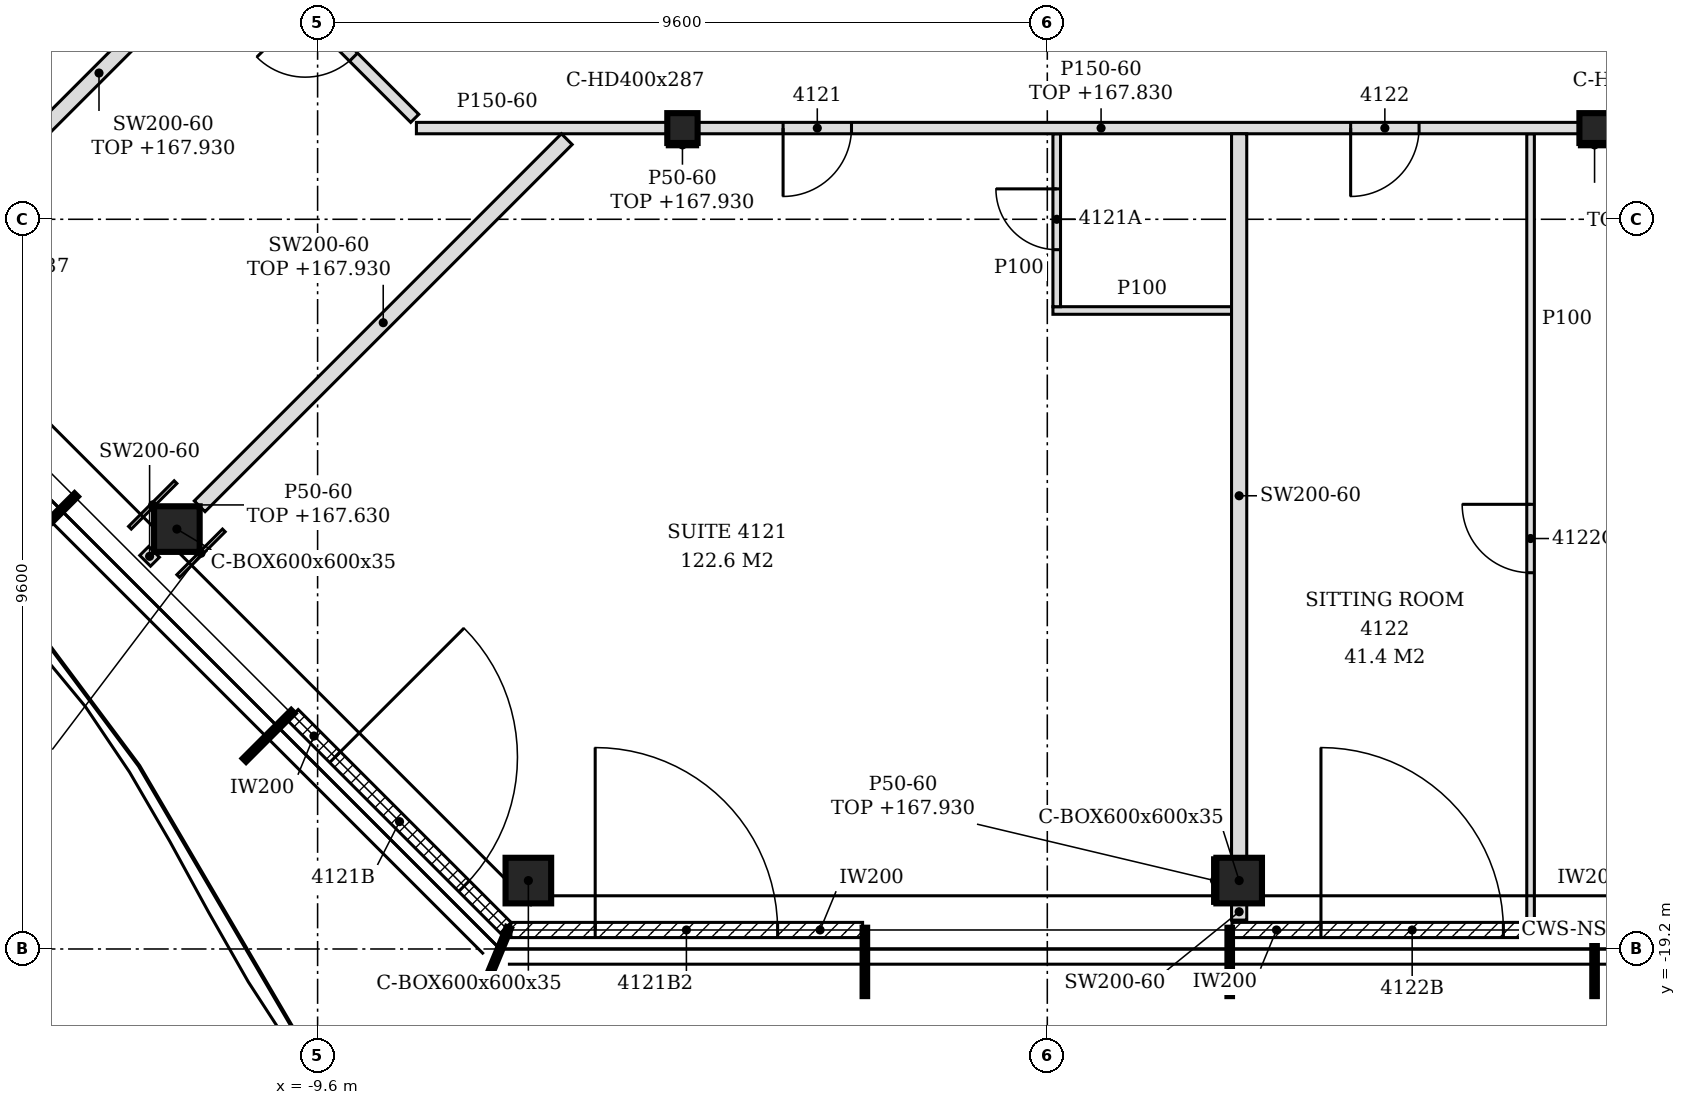
"""IFC4 building model, lengths in metres.
Left out: names, types, materials, properties, quantities, classifications, styles, units other than length and angle.
Written with IfcOpenShell. Run it as: python <this file> out.ifc"""

import sys

from ifc_helpers import new_model, si_unit, direction, frame, frame_2d, origin, origin_2d, place, context, subcontext, project, spatial, polyline, rectangle, hollow_rectangle, i_section, outline, extrude, element, fill, save


model = new_model("IFC4")
c1 = context("Model", 3, precision=1e-05, world=origin(), true_north=direction((0.0, 1.0)))
c2 = subcontext(c1, "Body", "Model", "MODEL_VIEW")
j1 = project(units=[si_unit("LENGTHUNIT", "METRE"), si_unit("PLANEANGLEUNIT", "RADIAN")], contexts=[c1])
p1 = place(None, origin())
s1 = spatial("IfcSite", under=j1, at=p1, CompositionType="ELEMENT")
p2 = place(p1, origin())
s2 = spatial("IfcBuilding", under=s1, at=p2, CompositionType="ELEMENT")
p3 = place(p2, frame((0.0, 0.0, 165.0)))
s3 = spatial("IfcBuildingStorey", under=s2, at=p3, CompositionType="ELEMENT", Elevation=165.0)
for number, where, z_axis, x_axis in (
    (1, (-6.827, -18.3, -0.15), (0.0, 0.0, 1.0), (1.0, 0.0, 0.0)),
    (2, (2.524, -18.3, -0.15), (0.0, 0.0, 1.0), (1.0, 0.0, 0.0)),
    (3, (-11.451, -13.676, -0.15), (0.0, 0.0, 1.0), (1.0, 0.0, 0.0)),
):
    element("IfcColumn", number, at=place(p3, frame(where, z_axis=z_axis, x_axis=x_axis)), inside=s3, PredefinedType="COLUMN", context=c2, shape_type="SweptSolid", body=[
        extrude(hollow_rectangle(XDim=0.6, YDim=0.6, WallThickness=0.035, at=origin_2d()), origin(), (0.0, 0.0, 1.0), 3.6),
    ])
for number, where, z_axis, x_axis in (
    (4, (-4.8, -8.4, -0.15), (0.0, 0.0, 1.0), (1.0, 0.0, 0.0)),
    (5, (7.2, -8.4, -0.15), (0.0, 0.0, 1.0), (1.0, 0.0, 0.0)),
):
    element("IfcColumn", number, at=place(p3, frame(where, z_axis=z_axis, x_axis=x_axis)), inside=s3, PredefinedType="COLUMN", context=c2, shape_type="SweptSolid", body=[
        extrude(i_section(OverallWidth=0.399, OverallDepth=0.393, WebThickness=0.023, FlangeThickness=0.037, FilletRadius=0.015, at=origin_2d()), origin(), (0.0, 0.0, 1.0), 3.6),
    ])
p4 = place(p3, frame((-7.056, -18.95, 0.0), z_axis=(0.0, 0.0, 1.0), x_axis=(1.0, 0.0, 0.0)))
e6 = element("IfcWall", 6, at=p4, inside=s3, PredefinedType="NOTDEFINED", context=c2, shape_type="SweptSolid", body=[
    extrude(rectangle(XDim=4.626, YDim=0.2, at=frame_2d((2.313, 0.0))), origin(), (0.0, 0.0, 1.0), 3.45),
])
p5 = place(p4, frame((1.108, 0.0, 0.0)))
e7 = element("IfcOpeningElement", 7, at=p5, cuts=e6, PredefinedType="OPENING", context=c2, shape_type="SweptSolid", body=[
    extrude(rectangle(XDim=2.4, YDim=2.4, at=frame_2d((1.2, 1.2))), frame((0.0, 0.11, 0.0), z_axis=(0.0, -1.0, 0.0), x_axis=(1.0, 0.0, 0.0)), (0.0, 0.0, 1.0), 0.22),
])
p6 = place(p3, frame((2.43, -18.95, 0.0), z_axis=(0.0, 0.0, 1.0), x_axis=(1.0, 0.0, 0.0)))
e8 = element("IfcWall", 8, at=p6, inside=s3, PredefinedType="NOTDEFINED", context=c2, shape_type="SweptSolid", body=[
    extrude(rectangle(XDim=4.74, YDim=0.2, at=frame_2d((2.37, 0.0))), origin(), (0.0, 0.0, 1.0), 3.45),
])
p7 = place(p6, frame((1.17, 0.0, 0.0)))
e9 = element("IfcOpeningElement", 9, at=p7, cuts=e8, PredefinedType="OPENING", context=c2, shape_type="SweptSolid", body=[
    extrude(rectangle(XDim=2.4, YDim=2.4, at=frame_2d((1.2, 1.2))), frame((0.0, 0.11, 0.0), z_axis=(0.0, -1.0, 0.0), x_axis=(1.0, 0.0, 0.0)), (0.0, 0.0, 1.0), 0.22),
])
p8 = place(p3, frame((7.23, -18.95, 0.0), z_axis=(0.0, 0.0, 1.0), x_axis=(1.0, 0.0, 0.0)))
e10 = element("IfcWall", 10, at=p8, inside=s3, PredefinedType="NOTDEFINED", context=c2, shape_type="SweptSolid", body=[
    extrude(rectangle(XDim=4.74, YDim=0.2, at=frame_2d((2.37, 0.0))), origin(), (0.0, 0.0, 1.0), 3.45),
])
p9 = place(p8, frame((1.17, 0.0, 0.0)))
e11 = element("IfcOpeningElement", 11, at=p9, cuts=e10, PredefinedType="OPENING", context=c2, shape_type="SweptSolid", body=[
    extrude(rectangle(XDim=2.4, YDim=2.4, at=frame_2d((1.2, 1.2))), frame((0.0, 0.11, 0.0), z_axis=(0.0, -1.0, 0.0), x_axis=(1.0, 0.0, 0.0)), (0.0, 0.0, 1.0), 0.22),
])
p10 = place(p3, frame((-9.926, -16.121, 0.0), z_axis=(0.0, 0.0, 1.0), x_axis=(0.707137595296, -0.707075965734, 0.0)))
e12 = element("IfcWall", 12, at=p10, inside=s3, PredefinedType="NOTDEFINED", context=c2, shape_type="SweptSolid", body=[
    extrude(rectangle(XDim=3.961, YDim=0.2, at=frame_2d((1.981, 0.0))), origin(), (0.0, 0.0, 1.0), 3.45),
])
p11 = place(p10, frame((0.786, 0.0, 0.0)))
e13 = element("IfcOpeningElement", 13, at=p11, cuts=e12, PredefinedType="OPENING", context=c2, shape_type="SweptSolid", body=[
    extrude(rectangle(XDim=2.4, YDim=2.4, at=frame_2d((1.2, 1.2))), frame((0.0, 0.11, 0.0), z_axis=(0.0, -1.0, 0.0), x_axis=(1.0, 0.0, 0.0)), (0.0, 0.0, 1.0), 0.22),
])
p12 = place(p3, frame((2.524, -18.82, 0.0), z_axis=(0.0, 0.0, 1.0), x_axis=(0.0, 1.0, 0.0)))
e14 = element("IfcWall", 14, at=p12, inside=s3, PredefinedType="PARTITIONING", context=c2, shape_type="SweptSolid", body=[
    extrude(rectangle(XDim=0.22, YDim=0.2, at=frame_2d((0.11, 0.0))), origin(), (0.0, 0.0, 1.0), 3.45),
])
p13 = place(p3, frame((6.358, -18.82, 0.0), z_axis=(0.0, 0.0, 1.0), x_axis=(0.0, 1.0, 0.0)))
e15 = element("IfcWall", 15, at=p13, inside=s3, PredefinedType="PARTITIONING", context=c2, shape_type="SweptSolid", body=[
    extrude(outline(polyline([(0.0, 0.0), (10.345, 0.0), (10.345, 2.83), (10.27, 2.83), (10.268, 3.45), (4.525, 3.45), (4.523, 2.88), (4.315, 2.88), (4.313, 3.45), (0.67, 3.45), (0.668, 2.93), (0.37, 2.93), (0.368, 3.45), (0.0, 3.45), (0.0, 0.0)])), frame((0.0, 0.05, 0.0), z_axis=(0.0, -1.0, 0.0), x_axis=(1.0, 0.0, 0.0)), (0.0, 0.0, 1.0), 0.1),
])
p14 = place(p13, frame((4.57, 0.0, 0.0)))
e16 = element("IfcOpeningElement", 16, at=p14, cuts=e15, PredefinedType="OPENING", context=c2, shape_type="SweptSolid", body=[
    extrude(rectangle(XDim=0.9, YDim=2.1, at=frame_2d((0.45, 1.05))), frame((0.0, 0.06, 0.0), z_axis=(0.0, -1.0, 0.0), x_axis=(1.0, 0.0, 0.0)), (0.0, 0.0, 1.0), 0.12),
])
p15 = place(p3, frame((2.524, -18.0, 0.0), z_axis=(0.0, 0.0, 1.0), x_axis=(0.0, 1.0, 0.0)))
e17 = element("IfcWall", 17, at=p15, inside=s3, PredefinedType="PARTITIONING", context=c2, shape_type="SweptSolid", body=[
    extrude(outline(polyline([(0.0, 0.0), (9.525, 0.0), (9.525, 2.83), (9.45, 2.83), (9.448, 3.45), (3.705, 3.45), (3.703, 2.88), (3.495, 2.88), (3.493, 3.45), (0.0, 3.45), (0.0, 0.0)])), frame((0.0, 0.1, 0.0), z_axis=(0.0, -1.0, 0.0), x_axis=(1.0, 0.0, 0.0)), (0.0, 0.0, 1.0), 0.2),
])
p16 = place(p3, frame((-11.869, -14.093, 0.0), z_axis=(0.0, 0.0, 1.0), x_axis=(0.707106781187, 0.707106781187, 0.0)))
e18 = element("IfcWall", 18, at=p16, inside=s3, PredefinedType="PARTITIONING", context=c2, shape_type="SweptSolid", body=[
    extrude(rectangle(XDim=0.166, YDim=0.2, at=frame_2d((0.083, 0.0))), origin(), (0.0, 0.0, 1.0), 3.45),
])
p17 = place(p3, frame((-11.152, -13.375, 0.0), z_axis=(0.0, 0.0, 1.0), x_axis=(0.707106781187, 0.707106781187, 0.0)))
e19 = element("IfcWall", 19, at=p17, inside=s3, PredefinedType="PARTITIONING", context=c2, shape_type="SweptSolid", body=[
    extrude(rectangle(XDim=6.83, YDim=0.2, at=frame_2d((3.415, 0.0))), origin(), (0.0, 0.0, 1.0), 2.93),
])
p18 = place(p3, frame((0.074, -10.8, 0.0), z_axis=(0.0, 0.0, 1.0), x_axis=(1.0, 0.0, 0.0)))
e20 = element("IfcWall", 20, at=p18, inside=s3, PredefinedType="PARTITIONING", context=c2, shape_type="SweptSolid", body=[
    extrude(rectangle(XDim=2.35, YDim=0.1, at=frame_2d((1.175, 0.0))), origin(), (0.0, 0.0, 1.0), 3.45),
])
p19 = place(p3, frame((0.124, -10.75, 0.0), z_axis=(0.0, 0.0, 1.0), x_axis=(0.0, 1.0, 0.0)))
e21 = element("IfcWall", 21, at=p19, inside=s3, PredefinedType="PARTITIONING", context=c2, shape_type="SweptSolid", body=[
    extrude(outline(polyline([(0.0, 0.0), (2.275, 0.0), (2.275, 2.83), (2.2, 2.83), (2.198, 3.45), (0.0, 3.45), (0.0, 0.0)])), frame((0.0, 0.05, 0.0), z_axis=(0.0, -1.0, 0.0), x_axis=(1.0, 0.0, 0.0)), (0.0, 0.0, 1.0), 0.1),
])
p20 = place(p19, frame((0.75, 0.0, 0.0)))
e22 = element("IfcOpeningElement", 22, at=p20, cuts=e21, PredefinedType="OPENING", context=c2, shape_type="SweptSolid", body=[
    extrude(rectangle(XDim=0.8, YDim=2.1, at=frame_2d((0.4, 1.05))), frame((0.0, 0.06, 0.0), z_axis=(0.0, -1.0, 0.0), x_axis=(1.0, 0.0, 0.0)), (0.0, 0.0, 1.0), 0.12),
])
p21 = place(p3, frame((-14.202, -9.402, 0.0), z_axis=(0.0, 0.0, 1.0), x_axis=(0.707081776084, 0.707131785404, 0.0)))
e23 = element("IfcWall", 23, at=p21, inside=s3, PredefinedType="PARTITIONING", context=c2, shape_type="SweptSolid", body=[
    extrude(rectangle(XDim=4.882, YDim=0.2, at=frame_2d((2.441, 0.0))), origin(), (0.0, 0.0, 1.0), 2.93),
])
p22 = place(p3, frame((-8.3, -8.4, 0.0), z_axis=(0.0, 0.0, 1.0), x_axis=(1.0, 0.0, 0.0)))
e24 = element("IfcWall", 24, at=p22, inside=s3, PredefinedType="PARTITIONING", context=c2, shape_type="SweptSolid", body=[
    extrude(rectangle(XDim=3.301, YDim=0.15, at=frame_2d((1.65, 0.0))), origin(), (0.0, 0.0, 1.0), 3.45),
])
p23 = place(p3, frame((-4.601, -8.4, 0.0), z_axis=(0.0, 0.0, 1.0), x_axis=(1.0, 0.0, 0.0)))
e25 = element("IfcWall", 25, at=p23, inside=s3, PredefinedType="PARTITIONING", context=c2, shape_type="SweptSolid", body=[
    extrude(rectangle(XDim=11.601, YDim=0.15, at=frame_2d((5.801, 0.0))), origin(), (0.0, 0.0, 1.0), 2.83),
])
p24 = place(p23, frame((1.125, 0.0, 0.0)))
e26 = element("IfcOpeningElement", 26, at=p24, cuts=e25, PredefinedType="OPENING", context=c2, shape_type="SweptSolid", body=[
    extrude(rectangle(XDim=0.9, YDim=2.1, at=frame_2d((0.45, 1.05))), frame((0.0, 0.085, 0.0), z_axis=(0.0, -1.0, 0.0), x_axis=(1.0, 0.0, 0.0)), (0.0, 0.0, 1.0), 0.17),
])
p25 = place(p23, frame((8.592, 0.0, 0.0)))
e27 = element("IfcOpeningElement", 27, at=p25, cuts=e25, PredefinedType="OPENING", context=c2, shape_type="SweptSolid", body=[
    extrude(rectangle(XDim=0.9, YDim=2.1, at=frame_2d((0.45, 1.05))), frame((0.0, 0.085, 0.0), z_axis=(0.0, -1.0, 0.0), x_axis=(1.0, 0.0, 0.0)), (0.0, 0.0, 1.0), 0.17),
])
p26 = place(p3, frame((-8.322, -8.272, 0.0), z_axis=(0.0, 0.0, 1.0), x_axis=(-0.707106781187, 0.707106781187, 0.0)))
e28 = element("IfcWall", 28, at=p26, inside=s3, PredefinedType="PARTITIONING", context=c2, shape_type="SweptSolid", body=[
    extrude(rectangle(XDim=6.718, YDim=0.15, at=frame_2d((3.359, 0.0))), origin(), (0.0, 0.0, 1.0), 2.93),
])
p27 = place(p26, frame((1.139, 0.0, 0.0)))
e29 = element("IfcOpeningElement", 29, at=p27, cuts=e28, PredefinedType="OPENING", context=c2, shape_type="SweptSolid", body=[
    extrude(rectangle(XDim=0.9, YDim=2.1, at=frame_2d((0.45, 1.05))), frame((0.0, 0.085, 0.0), z_axis=(0.0, -1.0, 0.0), x_axis=(1.0, 0.0, 0.0)), (0.0, 0.0, 1.0), 0.17),
])
p28 = place(p3, frame((2.199, -18.6, 0.0), z_axis=(0.0, 0.0, 1.0), x_axis=(0.0, 1.0, 0.0)))
e30 = element("IfcWall", 30, at=p28, inside=s3, PredefinedType="PARTITIONING", context=c2, shape_type="SweptSolid", body=[
    extrude(rectangle(XDim=0.6, YDim=0.05, at=frame_2d((0.3, 0.0))), origin(), (0.0, 0.0, 1.0), 2.93),
])
p29 = place(p3, frame((-12.069, -13.658, 0.0), z_axis=(0.0, 0.0, 1.0), x_axis=(0.707106781187, 0.707106781187, 0.0)))
e31 = element("IfcWall", 31, at=p29, inside=s3, PredefinedType="PARTITIONING", context=c2, shape_type="SweptSolid", body=[
    extrude(rectangle(XDim=0.848, YDim=0.05, at=frame_2d((0.424, 0.0))), origin(), (0.0, 0.0, 1.0), 2.63),
])
p30 = place(p3, frame((-11.434, -14.293, 0.0), z_axis=(0.0, 0.0, 1.0), x_axis=(0.707106781187, 0.707106781187, 0.0)))
e32 = element("IfcWall", 32, at=p30, inside=s3, PredefinedType="PARTITIONING", context=c2, shape_type="SweptSolid", body=[
    extrude(rectangle(XDim=0.849, YDim=0.05, at=frame_2d((0.424, 0.0))), origin(), (0.0, 0.0, 1.0), 2.93),
])
for number, where, z_axis, x_axis in (
    (33, (-5.0, -8.622, 0.0), (0.0, 0.0, 1.0), (1.0, 0.0, 0.0)),
    (34, (7.0, -8.622, 0.0), (0.0, 0.0, 1.0), (1.0, 0.0, 0.0)),
):
    element("IfcWall", number, at=place(p3, frame(where, z_axis=z_axis, x_axis=x_axis)), inside=s3, PredefinedType="PARTITIONING", context=c2, shape_type="SweptSolid", body=[
        extrude(rectangle(XDim=0.399, YDim=0.05, at=frame_2d((0.199, 0.0))), origin(), (0.0, 0.0, 1.0), 2.93),
    ])
p31 = place(p5, origin())
e35 = element("IfcDoor", 35, at=p31, inside=s3, OperationType="SINGLE_SWING_LEFT", PredefinedType="DOOR", context=c2, shape_type="SweptSolid", body=[
    extrude(rectangle(XDim=2.4, YDim=2.4, at=frame_2d((1.2, 1.2))), frame((0.0, 0.025, 0.0), z_axis=(0.0, -1.0, 0.0), x_axis=(1.0, 0.0, 0.0)), (0.0, 0.0, 1.0), 0.05),
])
fill(e7, e35)
p32 = place(p7, origin())
e36 = element("IfcDoor", 36, at=p32, inside=s3, OperationType="SINGLE_SWING_LEFT", PredefinedType="DOOR", context=c2, shape_type="SweptSolid", body=[
    extrude(rectangle(XDim=2.4, YDim=2.4, at=frame_2d((1.2, 1.2))), frame((0.0, 0.025, 0.0), z_axis=(0.0, -1.0, 0.0), x_axis=(1.0, 0.0, 0.0)), (0.0, 0.0, 1.0), 0.05),
])
fill(e9, e36)
p33 = place(p11, origin())
e37 = element("IfcDoor", 37, at=p33, inside=s3, OperationType="SINGLE_SWING_LEFT", PredefinedType="DOOR", context=c2, shape_type="SweptSolid", body=[
    extrude(rectangle(XDim=2.4, YDim=2.4, at=frame_2d((1.2, 1.2))), frame((0.0, 0.025, 0.0), z_axis=(0.0, -1.0, 0.0), x_axis=(1.0, 0.0, 0.0)), (0.0, 0.0, 1.0), 0.05),
])
fill(e13, e37)
p34 = place(p27, origin())
e38 = element("IfcDoor", 38, at=p34, inside=s3, OperationType="SINGLE_SWING_RIGHT", PredefinedType="DOOR", context=c2, shape_type="SweptSolid", body=[
    extrude(rectangle(XDim=0.9, YDim=2.1, at=frame_2d((0.45, 1.05))), frame((0.0, 0.025, 0.0), z_axis=(0.0, -1.0, 0.0), x_axis=(1.0, 0.0, 0.0)), (0.0, 0.0, 1.0), 0.05),
])
fill(e29, e38)
p35 = place(p24, frame((0.9, 0.0, 0.0), z_axis=(0.0, 0.0, 1.0), x_axis=(-1.0, 0.0, 0.0)))
e39 = element("IfcDoor", 39, at=p35, inside=s3, OperationType="SINGLE_SWING_RIGHT", PredefinedType="DOOR", context=c2, shape_type="SweptSolid", body=[
    extrude(rectangle(XDim=0.9, YDim=2.1, at=frame_2d((0.45, 1.05))), frame((0.0, 0.025, 0.0), z_axis=(0.0, -1.0, 0.0), x_axis=(1.0, 0.0, 0.0)), (0.0, 0.0, 1.0), 0.05),
])
fill(e26, e39)
p36 = place(p20, origin())
e40 = element("IfcDoor", 40, at=p36, inside=s3, OperationType="SINGLE_SWING_RIGHT", PredefinedType="DOOR", context=c2, shape_type="SweptSolid", body=[
    extrude(rectangle(XDim=0.8, YDim=2.1, at=frame_2d((0.4, 1.05))), frame((0.0, 0.025, 0.0), z_axis=(0.0, -1.0, 0.0), x_axis=(1.0, 0.0, 0.0)), (0.0, 0.0, 1.0), 0.05),
])
fill(e22, e40)
p37 = place(p25, frame((0.9, 0.0, 0.0), z_axis=(0.0, 0.0, 1.0), x_axis=(-1.0, 0.0, 0.0)))
e41 = element("IfcDoor", 41, at=p37, inside=s3, OperationType="SINGLE_SWING_RIGHT", PredefinedType="DOOR", context=c2, shape_type="SweptSolid", body=[
    extrude(rectangle(XDim=0.9, YDim=2.1, at=frame_2d((0.45, 1.05))), frame((0.0, 0.025, 0.0), z_axis=(0.0, -1.0, 0.0), x_axis=(1.0, 0.0, 0.0)), (0.0, 0.0, 1.0), 0.05),
])
fill(e27, e41)
p38 = place(p14, origin())
e42 = element("IfcDoor", 42, at=p38, inside=s3, OperationType="SINGLE_SWING_RIGHT", PredefinedType="DOOR", context=c2, shape_type="SweptSolid", body=[
    extrude(rectangle(XDim=0.9, YDim=2.1, at=frame_2d((0.45, 1.05))), frame((0.0, 0.025, 0.0), z_axis=(0.0, -1.0, 0.0), x_axis=(1.0, 0.0, 0.0)), (0.0, 0.0, 1.0), 0.05),
])
fill(e16, e42)
save(model, sys.argv[1])
